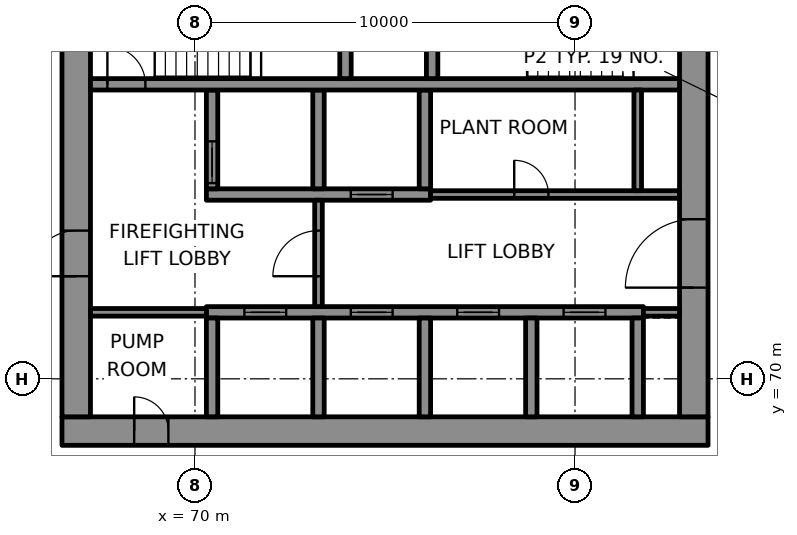
"""IFC4 building model, lengths in metres.
Left out: names, types, materials, properties, quantities, classifications, styles, units other than length and angle.
Written with IfcOpenShell. Run it as: python <this file> out.ifc"""

import sys

from ifc_helpers import new_model, si_unit, direction, frame, frame_2d, origin, place, context, subcontext, project, spatial, rectangle, extrude, element, fill, save


model = new_model("IFC4")
c1 = context("Model", 3, precision=1e-05, world=origin(), true_north=direction((0.0, 1.0)))
c2 = subcontext(c1, "Body", "Model", "MODEL_VIEW")
j1 = project(units=[si_unit("LENGTHUNIT", "METRE"), si_unit("PLANEANGLEUNIT", "RADIAN")], contexts=[c1])
p1 = place(None, origin())
s1 = spatial("IfcSite", under=j1, at=p1, CompositionType="ELEMENT")
p2 = place(p1, origin())
s2 = spatial("IfcBuilding", under=s1, at=p2, CompositionType="ELEMENT")
p3 = place(p2, frame((0.0, 0.0, 256.6)))
s3 = spatial("IfcBuildingStorey", under=s2, at=p3, CompositionType="ELEMENT", Elevation=256.6)
p4 = place(p3, frame((66.5, 68.625, 0.0), z_axis=(0.0, 0.0, 1.0), x_axis=(1.0, 0.0, 0.0)))
e1 = element("IfcWall", 1, at=p4, inside=s3, PredefinedType="SHEAR", context=c2, shape_type="SweptSolid", body=[
    extrude(rectangle(XDim=17.0, YDim=0.75, at=frame_2d((8.5, 0.0))), origin(), (0.0, 0.0, 1.0), 3.3),
])
p5 = place(p4, frame((1.9, 0.0, 0.0)))
e2 = element("IfcOpeningElement", 2, at=p5, cuts=e1, PredefinedType="OPENING", context=c2, shape_type="SweptSolid", body=[
    extrude(rectangle(XDim=0.9, YDim=2.1, at=frame_2d((0.45, 1.05))), frame((0.0, 0.385, 0.0), z_axis=(0.0, -1.0, 0.0), x_axis=(1.0, 0.0, 0.0)), (0.0, 0.0, 1.0), 0.77),
])
p6 = place(p3, frame((66.875, 69.0, 0.0), z_axis=(0.0, 0.0, 1.0), x_axis=(0.0, 1.0, 0.0)))
e3 = element("IfcWall", 3, at=p6, inside=s3, PredefinedType="SHEAR", context=c2, shape_type="SweptSolid", body=[
    extrude(rectangle(XDim=12.0, YDim=0.75, at=frame_2d((6.0, 0.0))), origin(), (0.0, 0.0, 1.0), 3.3),
])
p7 = place(p6, frame((3.7, 0.0, 0.0)))
e4 = element("IfcOpeningElement", 4, at=p7, cuts=e3, PredefinedType="OPENING", context=c2, shape_type="SweptSolid", body=[
    extrude(rectangle(XDim=1.2, YDim=2.1, at=frame_2d((0.6, 1.05))), frame((0.0, 0.385, 0.0), z_axis=(0.0, -1.0, 0.0), x_axis=(1.0, 0.0, 0.0)), (0.0, 0.0, 1.0), 0.77),
])
p8 = place(p3, frame((83.125, 69.0, 0.0), z_axis=(0.0, 0.0, 1.0), x_axis=(0.0, 1.0, 0.0)))
e5 = element("IfcWall", 5, at=p8, inside=s3, PredefinedType="SHEAR", context=c2, shape_type="SweptSolid", body=[
    extrude(rectangle(XDim=12.0, YDim=0.75, at=frame_2d((6.0, 0.0))), origin(), (0.0, 0.0, 1.0), 3.3),
])
p9 = place(p8, frame((3.4, 0.0, 0.0)))
e6 = element("IfcOpeningElement", 6, at=p9, cuts=e5, PredefinedType="OPENING", context=c2, shape_type="SweptSolid", body=[
    extrude(rectangle(XDim=1.8, YDim=2.1, at=frame_2d((0.9, 1.05))), frame((0.0, 0.385, 0.0), z_axis=(0.0, -1.0, 0.0), x_axis=(1.0, 0.0, 0.0)), (0.0, 0.0, 1.0), 0.77),
])
p10 = place(p3, frame((70.3, 71.75, 0.0), z_axis=(0.0, 0.0, 1.0), x_axis=(1.0, 0.0, 0.0)))
e7 = element("IfcWall", 7, at=p10, inside=s3, PredefinedType="SHEAR", context=c2, shape_type="SweptSolid", body=[
    extrude(rectangle(XDim=11.5, YDim=0.3, at=frame_2d((5.75, 0.0))), origin(), (0.0, 0.0, 1.0), 3.3),
])
p11 = place(p10, frame((1.0, 0.0, 0.0)))
e8 = element("IfcOpeningElement", 8, at=p11, cuts=e7, PredefinedType="OPENING", context=c2, shape_type="SweptSolid", body=[
    extrude(rectangle(XDim=1.1, YDim=2.1, at=frame_2d((0.55, 1.05))), frame((0.0, 0.16, 0.0), z_axis=(0.0, -1.0, 0.0), x_axis=(1.0, 0.0, 0.0)), (0.0, 0.0, 1.0), 0.32),
])
p12 = place(p10, frame((3.8, 0.0, 0.0)))
e9 = element("IfcOpeningElement", 9, at=p12, cuts=e7, PredefinedType="OPENING", context=c2, shape_type="SweptSolid", body=[
    extrude(rectangle(XDim=1.1, YDim=2.1, at=frame_2d((0.55, 1.05))), frame((0.0, 0.16, 0.0), z_axis=(0.0, -1.0, 0.0), x_axis=(1.0, 0.0, 0.0)), (0.0, 0.0, 1.0), 0.32),
])
p13 = place(p10, frame((6.6, 0.0, 0.0)))
e10 = element("IfcOpeningElement", 10, at=p13, cuts=e7, PredefinedType="OPENING", context=c2, shape_type="SweptSolid", body=[
    extrude(rectangle(XDim=1.1, YDim=2.1, at=frame_2d((0.55, 1.05))), frame((0.0, 0.16, 0.0), z_axis=(0.0, -1.0, 0.0), x_axis=(1.0, 0.0, 0.0)), (0.0, 0.0, 1.0), 0.32),
])
p14 = place(p10, frame((9.4, 0.0, 0.0)))
e11 = element("IfcOpeningElement", 11, at=p14, cuts=e7, PredefinedType="OPENING", context=c2, shape_type="SweptSolid", body=[
    extrude(rectangle(XDim=1.1, YDim=2.1, at=frame_2d((0.55, 1.05))), frame((0.0, 0.16, 0.0), z_axis=(0.0, -1.0, 0.0), x_axis=(1.0, 0.0, 0.0)), (0.0, 0.0, 1.0), 0.32),
])
p15 = place(p3, frame((70.3, 74.85, 0.0), z_axis=(0.0, 0.0, 1.0), x_axis=(1.0, 0.0, 0.0)))
e12 = element("IfcWall", 12, at=p15, inside=s3, PredefinedType="SHEAR", context=c2, shape_type="SweptSolid", body=[
    extrude(rectangle(XDim=5.9, YDim=0.3, at=frame_2d((2.95, 0.0))), origin(), (0.0, 0.0, 1.0), 3.3),
])
p16 = place(p15, frame((3.8, 0.0, 0.0)))
e13 = element("IfcOpeningElement", 13, at=p16, cuts=e12, PredefinedType="OPENING", context=c2, shape_type="SweptSolid", body=[
    extrude(rectangle(XDim=1.1, YDim=2.1, at=frame_2d((0.55, 1.05))), frame((0.0, 0.16, 0.0), z_axis=(0.0, -1.0, 0.0), x_axis=(1.0, 0.0, 0.0)), (0.0, 0.0, 1.0), 0.32),
])
p17 = place(p3, frame((70.45, 69.0, 0.0), z_axis=(0.0, 0.0, 1.0), x_axis=(0.0, 1.0, 0.0)))
e14 = element("IfcWall", 14, at=p17, inside=s3, PredefinedType="SHEAR", context=c2, shape_type="SweptSolid", body=[
    extrude(rectangle(XDim=2.6, YDim=0.3, at=frame_2d((1.3, 0.0))), origin(), (0.0, 0.0, 1.0), 3.3),
])
p18 = place(p3, frame((70.45, 75.0, 0.0), z_axis=(0.0, 0.0, 1.0), x_axis=(0.0, 1.0, 0.0)))
e15 = element("IfcWall", 15, at=p18, inside=s3, PredefinedType="SHEAR", context=c2, shape_type="SweptSolid", body=[
    extrude(rectangle(XDim=2.6, YDim=0.3, at=frame_2d((1.3, 0.0))), origin(), (0.0, 0.0, 1.0), 3.3),
])
p19 = place(p18, frame((0.15, 0.0, 0.0)))
e16 = element("IfcOpeningElement", 16, at=p19, cuts=e15, PredefinedType="OPENING", context=c2, shape_type="SweptSolid", body=[
    extrude(rectangle(XDim=1.1, YDim=2.1, at=frame_2d((0.55, 1.05))), frame((0.0, 0.16, 0.0), z_axis=(0.0, -1.0, 0.0), x_axis=(1.0, 0.0, 0.0)), (0.0, 0.0, 1.0), 0.32),
])
for number, where, z_axis, x_axis in (
    (17, (73.25, 69.0, 0.0), (0.0, 0.0, 1.0), (0.0, 1.0, 0.0)),
    (18, (73.25, 75.0, 0.0), (0.0, 0.0, 1.0), (0.0, 1.0, 0.0)),
    (19, (76.05, 69.0, 0.0), (0.0, 0.0, 1.0), (0.0, 1.0, 0.0)),
    (20, (76.05, 75.0, 0.0), (0.0, 0.0, 1.0), (0.0, 1.0, 0.0)),
    (21, (78.85, 69.0, 0.0), (0.0, 0.0, 1.0), (0.0, 1.0, 0.0)),
    (22, (81.65, 69.0, 0.0), (0.0, 0.0, 1.0), (0.0, 1.0, 0.0)),
):
    element("IfcWall", number, at=place(p3, frame(where, z_axis=z_axis, x_axis=x_axis)), inside=s3, PredefinedType="SHEAR", context=c2, shape_type="SweptSolid", body=[
        extrude(rectangle(XDim=2.6, YDim=0.3, at=frame_2d((1.3, 0.0))), origin(), (0.0, 0.0, 1.0), 3.3),
    ])
p20 = place(p3, frame((67.25, 77.75, 0.0), z_axis=(0.0, 0.0, 1.0), x_axis=(1.0, 0.0, 0.0)))
e23 = element("IfcWall", 23, at=p20, inside=s3, PredefinedType="SHEAR", context=c2, shape_type="SweptSolid", body=[
    extrude(rectangle(XDim=15.5, YDim=0.3, at=frame_2d((7.75, 0.0))), origin(), (0.0, 0.0, 1.0), 3.3),
])
p21 = place(p20, frame((0.445, 0.0, 0.0)))
e24 = element("IfcOpeningElement", 24, at=p21, cuts=e23, PredefinedType="OPENING", context=c2, shape_type="SweptSolid", body=[
    extrude(rectangle(XDim=1.0, YDim=2.1, at=frame_2d((0.5, 1.05))), frame((0.0, 0.16, 0.0), z_axis=(0.0, -1.0, 0.0), x_axis=(1.0, 0.0, 0.0)), (0.0, 0.0, 1.0), 0.32),
])
for number, where, z_axis, x_axis in (
    (25, (73.96, 77.9, 0.0), (0.0, 0.0, 1.0), (0.0, 1.0, 0.0)),
    (26, (76.24, 77.9, 0.0), (0.0, 0.0, 1.0), (0.0, 1.0, 0.0)),
):
    element("IfcWall", number, at=place(p3, frame(where, z_axis=z_axis, x_axis=x_axis)), inside=s3, PredefinedType="SHEAR", context=c2, shape_type="SweptSolid", body=[
        extrude(rectangle(XDim=3.1, YDim=0.3, at=frame_2d((1.55, 0.0))), origin(), (0.0, 0.0, 1.0), 3.3),
    ])
p22 = place(p3, frame((67.25, 71.75, 0.0), z_axis=(0.0, 0.0, 1.0), x_axis=(1.0, 0.0, 0.0)))
e27 = element("IfcWall", 27, at=p22, inside=s3, PredefinedType="PARTITIONING", context=c2, shape_type="SweptSolid", body=[
    extrude(rectangle(XDim=3.05, YDim=0.2, at=frame_2d((1.525, 0.0))), origin(), (0.0, 0.0, 1.0), 3.3),
])
p23 = place(p3, frame((81.8, 71.75, 0.0), z_axis=(0.0, 0.0, 1.0), x_axis=(1.0, 0.0, 0.0)))
e28 = element("IfcWall", 28, at=p23, inside=s3, PredefinedType="PARTITIONING", context=c2, shape_type="SweptSolid", body=[
    extrude(rectangle(XDim=0.95, YDim=0.2, at=frame_2d((0.475, 0.0))), origin(), (0.0, 0.0, 1.0), 3.3),
])
p24 = place(p3, frame((76.2, 74.85, 0.0), z_axis=(0.0, 0.0, 1.0), x_axis=(1.0, 0.0, 0.0)))
e29 = element("IfcWall", 29, at=p24, inside=s3, PredefinedType="PARTITIONING", context=c2, shape_type="SweptSolid", body=[
    extrude(rectangle(XDim=6.55, YDim=0.2, at=frame_2d((3.275, 0.0))), origin(), (0.0, 0.0, 1.0), 3.3),
])
p25 = place(p24, frame((2.2, 0.0, 0.0)))
e30 = element("IfcOpeningElement", 30, at=p25, cuts=e29, PredefinedType="OPENING", context=c2, shape_type="SweptSolid", body=[
    extrude(rectangle(XDim=0.9, YDim=2.1, at=frame_2d((0.45, 1.05))), frame((0.0, 0.11, 0.0), z_axis=(0.0, -1.0, 0.0), x_axis=(1.0, 0.0, 0.0)), (0.0, 0.0, 1.0), 0.22),
])
p26 = place(p3, frame((73.25, 71.9, 0.0), z_axis=(0.0, 0.0, 1.0), x_axis=(0.0, 1.0, 0.0)))
e31 = element("IfcWall", 31, at=p26, inside=s3, PredefinedType="PARTITIONING", context=c2, shape_type="SweptSolid", body=[
    extrude(rectangle(XDim=2.8, YDim=0.2, at=frame_2d((1.4, 0.0))), origin(), (0.0, 0.0, 1.0), 3.3),
])
p27 = place(p26, frame((0.8, 0.0, 0.0)))
e32 = element("IfcOpeningElement", 32, at=p27, cuts=e31, PredefinedType="OPENING", context=c2, shape_type="SweptSolid", body=[
    extrude(rectangle(XDim=1.2, YDim=2.1, at=frame_2d((0.6, 1.05))), frame((0.0, 0.11, 0.0), z_axis=(0.0, -1.0, 0.0), x_axis=(1.0, 0.0, 0.0)), (0.0, 0.0, 1.0), 0.22),
])
p28 = place(p3, frame((81.65, 74.95, 0.0), z_axis=(0.0, 0.0, 1.0), x_axis=(0.0, 1.0, 0.0)))
e33 = element("IfcWall", 33, at=p28, inside=s3, PredefinedType="PARTITIONING", context=c2, shape_type="SweptSolid", body=[
    extrude(rectangle(XDim=2.65, YDim=0.2, at=frame_2d((1.325, 0.0))), origin(), (0.0, 0.0, 1.0), 3.3),
])
p29 = place(p11, origin())
e34 = element("IfcDoor", 34, at=p29, inside=s3, OperationType="DOUBLE_DOOR_SLIDING", PredefinedType="DOOR", context=c2, shape_type="SweptSolid", body=[
    extrude(rectangle(XDim=1.1, YDim=2.1, at=frame_2d((0.55, 1.05))), frame((0.0, 0.025, 0.0), z_axis=(0.0, -1.0, 0.0), x_axis=(1.0, 0.0, 0.0)), (0.0, 0.0, 1.0), 0.05),
])
fill(e8, e34)
p30 = place(p12, origin())
e35 = element("IfcDoor", 35, at=p30, inside=s3, OperationType="DOUBLE_DOOR_SLIDING", PredefinedType="DOOR", context=c2, shape_type="SweptSolid", body=[
    extrude(rectangle(XDim=1.1, YDim=2.1, at=frame_2d((0.55, 1.05))), frame((0.0, 0.025, 0.0), z_axis=(0.0, -1.0, 0.0), x_axis=(1.0, 0.0, 0.0)), (0.0, 0.0, 1.0), 0.05),
])
fill(e9, e35)
p31 = place(p13, origin())
e36 = element("IfcDoor", 36, at=p31, inside=s3, OperationType="DOUBLE_DOOR_SLIDING", PredefinedType="DOOR", context=c2, shape_type="SweptSolid", body=[
    extrude(rectangle(XDim=1.1, YDim=2.1, at=frame_2d((0.55, 1.05))), frame((0.0, 0.025, 0.0), z_axis=(0.0, -1.0, 0.0), x_axis=(1.0, 0.0, 0.0)), (0.0, 0.0, 1.0), 0.05),
])
fill(e10, e36)
p32 = place(p14, origin())
e37 = element("IfcDoor", 37, at=p32, inside=s3, OperationType="DOUBLE_DOOR_SLIDING", PredefinedType="DOOR", context=c2, shape_type="SweptSolid", body=[
    extrude(rectangle(XDim=1.1, YDim=2.1, at=frame_2d((0.55, 1.05))), frame((0.0, 0.025, 0.0), z_axis=(0.0, -1.0, 0.0), x_axis=(1.0, 0.0, 0.0)), (0.0, 0.0, 1.0), 0.05),
])
fill(e11, e37)
p33 = place(p19, origin())
e38 = element("IfcDoor", 38, at=p33, inside=s3, OperationType="DOUBLE_DOOR_SLIDING", PredefinedType="DOOR", context=c2, shape_type="SweptSolid", body=[
    extrude(rectangle(XDim=1.1, YDim=2.1, at=frame_2d((0.55, 1.05))), frame((0.0, 0.025, 0.0), z_axis=(0.0, -1.0, 0.0), x_axis=(1.0, 0.0, 0.0)), (0.0, 0.0, 1.0), 0.05),
])
fill(e16, e38)
p34 = place(p16, origin())
e39 = element("IfcDoor", 39, at=p34, inside=s3, OperationType="DOUBLE_DOOR_SLIDING", PredefinedType="DOOR", context=c2, shape_type="SweptSolid", body=[
    extrude(rectangle(XDim=1.1, YDim=2.1, at=frame_2d((0.55, 1.05))), frame((0.0, 0.025, 0.0), z_axis=(0.0, -1.0, 0.0), x_axis=(1.0, 0.0, 0.0)), (0.0, 0.0, 1.0), 0.05),
])
fill(e13, e39)
p35 = place(p21, origin())
e40 = element("IfcDoor", 40, at=p35, inside=s3, OperationType="SINGLE_SWING_LEFT", PredefinedType="DOOR", context=c2, shape_type="SweptSolid", body=[
    extrude(rectangle(XDim=1.0, YDim=2.1, at=frame_2d((0.5, 1.05))), frame((0.0, 0.025, 0.0), z_axis=(0.0, -1.0, 0.0), x_axis=(1.0, 0.0, 0.0)), (0.0, 0.0, 1.0), 0.05),
])
fill(e24, e40)
p36 = place(p27, origin())
e41 = element("IfcDoor", 41, at=p36, inside=s3, OperationType="SINGLE_SWING_LEFT", PredefinedType="DOOR", context=c2, shape_type="SweptSolid", body=[
    extrude(rectangle(XDim=1.2, YDim=2.1, at=frame_2d((0.6, 1.05))), frame((0.0, 0.025, 0.0), z_axis=(0.0, -1.0, 0.0), x_axis=(1.0, 0.0, 0.0)), (0.0, 0.0, 1.0), 0.05),
])
fill(e32, e41)
p37 = place(p7, origin())
e42 = element("IfcDoor", 42, at=p37, inside=s3, OperationType="SINGLE_SWING_RIGHT", PredefinedType="DOOR", context=c2, shape_type="SweptSolid", body=[
    extrude(rectangle(XDim=1.2, YDim=2.1, at=frame_2d((0.6, 1.05))), frame((0.0, 0.095, 0.0), z_axis=(0.0, -1.0, 0.0), x_axis=(1.0, 0.0, 0.0)), (0.0, 0.0, 1.0), 0.19),
])
fill(e4, e42)
p38 = place(p9, origin())
e43 = element("IfcDoor", 43, at=p38, inside=s3, OperationType="SINGLE_SWING_LEFT", PredefinedType="DOOR", context=c2, shape_type="SweptSolid", body=[
    extrude(rectangle(XDim=1.8, YDim=2.1, at=frame_2d((0.9, 1.05))), frame((0.0, 0.095, 0.0), z_axis=(0.0, -1.0, 0.0), x_axis=(1.0, 0.0, 0.0)), (0.0, 0.0, 1.0), 0.19),
])
fill(e6, e43)
p39 = place(p5, origin())
e44 = element("IfcDoor", 44, at=p39, inside=s3, OperationType="SINGLE_SWING_RIGHT", PredefinedType="DOOR", context=c2, shape_type="SweptSolid", body=[
    extrude(rectangle(XDim=0.9, YDim=2.1, at=frame_2d((0.45, 1.05))), frame((0.0, 0.095, 0.0), z_axis=(0.0, -1.0, 0.0), x_axis=(1.0, 0.0, 0.0)), (0.0, 0.0, 1.0), 0.19),
])
fill(e2, e44)
p40 = place(p25, origin())
e45 = element("IfcDoor", 45, at=p40, inside=s3, OperationType="SINGLE_SWING_LEFT", PredefinedType="DOOR", context=c2, shape_type="SweptSolid", body=[
    extrude(rectangle(XDim=0.9, YDim=2.1, at=frame_2d((0.45, 1.05))), frame((0.0, 0.025, 0.0), z_axis=(0.0, -1.0, 0.0), x_axis=(1.0, 0.0, 0.0)), (0.0, 0.0, 1.0), 0.05),
])
fill(e30, e45)
save(model, sys.argv[1])
